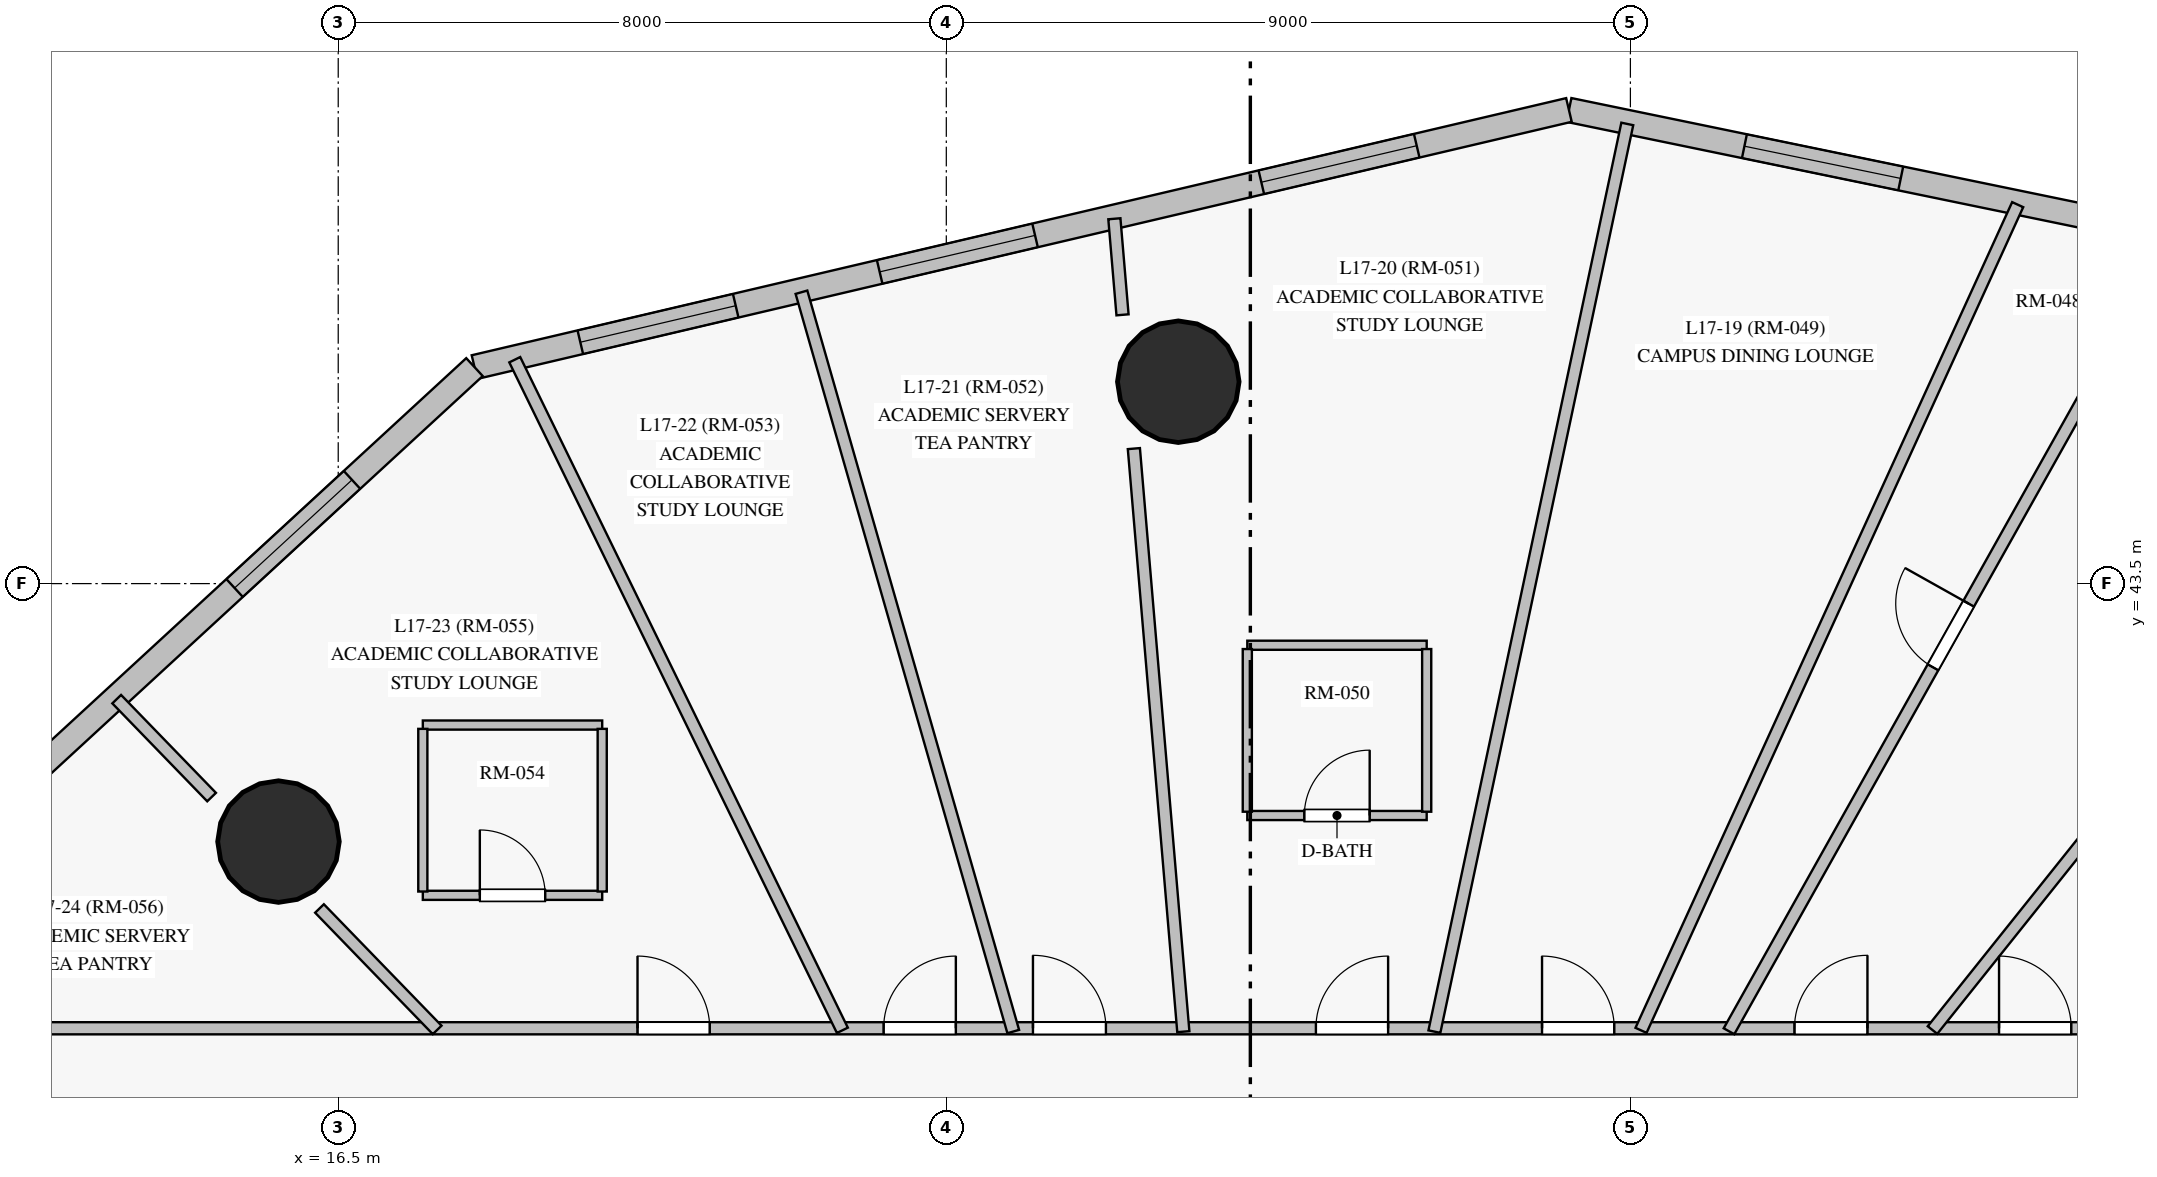
"""IFC4 building model, lengths in metres.
Left out: names, types, materials, properties, quantities, classifications, styles, units other than length and angle.
Written with IfcOpenShell. Run it as: python <this file> out.ifc"""

import sys

from ifc_helpers import new_model, si_unit, direction, frame, frame_2d, origin, origin_with_axes, origin_2d, place, context, subcontext, project, spatial, rectangle, circle, extrude, source, transform, mapped, element, fill, save


model = new_model("IFC4")
c1 = context("Model", 3, precision=1e-05, world=origin(), true_north=direction((0.0, 1.0)))
c2 = subcontext(c1, "Body", "Model", "MODEL_VIEW")
j1 = project(units=[si_unit("LENGTHUNIT", "METRE"), si_unit("PLANEANGLEUNIT", "RADIAN")], contexts=[c1])
p1 = place(None, origin())
s1 = spatial("IfcSite", under=j1, at=p1, CompositionType="ELEMENT")
p2 = place(p1, origin())
s2 = spatial("IfcBuilding", under=s1, at=p2, CompositionType="ELEMENT")
p3 = place(p2, frame((0.0, 0.0, 66.1)))
s3 = spatial("IfcBuildingStorey", under=s2, at=p3, CompositionType="ELEMENT", Elevation=66.1)
m1 = source(origin_with_axes(), c2, "Body", "SweptSolid", [
    extrude(circle(Radius=0.8, at=origin_2d()), origin(), (0.0, 0.0, 1.0), 3.6),
])
for number, where, z_axis, x_axis in (
    (1, (27.552, 46.156, 0.0), (0.0, 0.0, 1.0), (1.0, 0.0, 0.0)),
    (2, (15.714, 40.106, 0.0), (0.0, 0.0, 1.0), (1.0, 0.0, 0.0)),
):
    element("IfcColumn", number, at=place(p3, frame(where, z_axis=z_axis, x_axis=x_axis)), inside=s3, PredefinedType="COLUMN", context=c2, shape_type="MappedRepresentation", body=[
        mapped(m1, transform((0.0, 0.0, 0.0), scale=1.0)),
    ])
p4 = place(p3, frame((42.676, 47.671, 0.0), z_axis=(0.0, 0.0, 1.0), x_axis=(-0.979362200274, 0.20211303935, 0.0)))
e3 = element("IfcWall", 3, at=p4, inside=s3, PredefinedType="SOLIDWALL", context=c2, shape_type="SweptSolid", body=[
    extrude(rectangle(XDim=10.195, YDim=0.32, at=frame_2d((5.098, 0.0))), origin(), (0.0, 0.0, 1.0), 3.35),
])
p5 = place(p4, frame((5.738, 0.0, 0.85)))
e4 = element("IfcOpeningElement", 4, at=p5, cuts=e3, PredefinedType="OPENING", context=c2, shape_type="SweptSolid", body=[
    extrude(rectangle(XDim=2.1, YDim=1.95, at=frame_2d((1.05, 0.975))), frame((0.0, 0.17, 0.0), z_axis=(0.0, -1.0, 0.0), x_axis=(1.0, 0.0, 0.0)), (0.0, 0.0, 1.0), 0.34),
])
p6 = place(p3, frame((32.691, 49.731, 0.0), z_axis=(0.0, 0.0, 1.0), x_axis=(-0.973494178879, -0.228711791759, 0.0)))
e5 = element("IfcWall", 5, at=p6, inside=s3, PredefinedType="SOLIDWALL", context=c2, shape_type="SweptSolid", body=[
    extrude(rectangle(XDim=14.791, YDim=0.32, at=frame_2d((7.396, 0.0))), origin(), (0.0, 0.0, 1.0), 3.35),
])
p7 = place(p6, frame((2.057, 0.0, 0.85)))
e6 = element("IfcOpeningElement", 6, at=p7, cuts=e5, PredefinedType="OPENING", context=c2, shape_type="SweptSolid", body=[
    extrude(rectangle(XDim=2.1, YDim=1.95, at=frame_2d((1.05, 0.975))), frame((0.0, 0.17, 0.0), z_axis=(0.0, -1.0, 0.0), x_axis=(1.0, 0.0, 0.0)), (0.0, 0.0, 1.0), 0.34),
])
p8 = place(p6, frame((7.215, 0.0, 0.85)))
e7 = element("IfcOpeningElement", 7, at=p8, cuts=e5, PredefinedType="OPENING", context=c2, shape_type="SweptSolid", body=[
    extrude(rectangle(XDim=2.1, YDim=1.95, at=frame_2d((1.05, 0.975))), frame((0.0, 0.17, 0.0), z_axis=(0.0, -1.0, 0.0), x_axis=(1.0, 0.0, 0.0)), (0.0, 0.0, 1.0), 0.34),
])
p9 = place(p6, frame((11.26, 0.0, 0.85)))
e8 = element("IfcOpeningElement", 8, at=p9, cuts=e5, PredefinedType="OPENING", context=c2, shape_type="SweptSolid", body=[
    extrude(rectangle(XDim=2.1, YDim=1.95, at=frame_2d((1.05, 0.975))), frame((0.0, 0.17, 0.0), z_axis=(0.0, -1.0, 0.0), x_axis=(1.0, 0.0, 0.0)), (0.0, 0.0, 1.0), 0.34),
])
p10 = place(p3, frame((18.293, 46.348, 0.0), z_axis=(0.0, 0.0, 1.0), x_axis=(-0.735624378621, -0.677389676316, 0.0)))
e9 = element("IfcWall", 9, at=p10, inside=s3, PredefinedType="SOLIDWALL", context=c2, shape_type="SweptSolid", body=[
    extrude(rectangle(XDim=11.873, YDim=0.32, at=frame_2d((5.937, 0.0))), origin(), (0.0, 0.0, 1.0), 3.35),
])
p11 = place(p10, frame((2.19, 0.0, 0.85)))
e10 = element("IfcOpeningElement", 10, at=p11, cuts=e9, PredefinedType="OPENING", context=c2, shape_type="SweptSolid", body=[
    extrude(rectangle(XDim=2.1, YDim=1.95, at=frame_2d((1.05, 0.975))), frame((0.0, 0.17, 0.0), z_axis=(0.0, -1.0, 0.0), x_axis=(1.0, 0.0, 0.0)), (0.0, 0.0, 1.0), 0.34),
])
p12 = place(p10, frame((8.067, 0.0, 0.85)))
e11 = element("IfcOpeningElement", 11, at=p12, cuts=e9, PredefinedType="OPENING", context=c2, shape_type="SweptSolid", body=[
    extrude(rectangle(XDim=2.1, YDim=1.95, at=frame_2d((1.05, 0.975))), frame((0.0, 0.17, 0.0), z_axis=(0.0, -1.0, 0.0), x_axis=(1.0, 0.0, 0.0)), (0.0, 0.0, 1.0), 0.34),
])
p13 = place(p3, frame((10.5, 37.65, 0.0), z_axis=(0.0, 0.0, 1.0), x_axis=(1.0, 0.0, 0.0)))
e12 = element("IfcWall", 12, at=p13, inside=s3, PredefinedType="PARTITIONING", context=c2, shape_type="SweptSolid", body=[
    extrude(rectangle(XDim=29.75, YDim=0.16, at=frame_2d((14.875, 0.0))), origin(), (0.0, 0.0, 1.0), 2.75),
])
p14 = place(p13, frame((27.85, 0.0, 0.0)))
e13 = element("IfcOpeningElement", 13, at=p14, cuts=e12, PredefinedType="OPENING", context=c2, shape_type="SweptSolid", body=[
    extrude(rectangle(XDim=0.95, YDim=2.15, at=frame_2d((0.475, 1.075))), frame((0.0, 0.09, 0.0), z_axis=(0.0, -1.0, 0.0), x_axis=(1.0, 0.0, 0.0)), (0.0, 0.0, 1.0), 0.18),
])
p15 = place(p13, frame((25.159, 0.0, 0.0)))
e14 = element("IfcOpeningElement", 14, at=p15, cuts=e12, PredefinedType="OPENING", context=c2, shape_type="SweptSolid", body=[
    extrude(rectangle(XDim=0.96, YDim=2.15, at=frame_2d((0.48, 1.075))), frame((0.0, 0.09, 0.0), z_axis=(0.0, -1.0, 0.0), x_axis=(1.0, 0.0, 0.0)), (0.0, 0.0, 1.0), 0.18),
])
p16 = place(p13, frame((21.837, 0.0, 0.0)))
e15 = element("IfcOpeningElement", 15, at=p16, cuts=e12, PredefinedType="OPENING", context=c2, shape_type="SweptSolid", body=[
    extrude(rectangle(XDim=0.95, YDim=2.15, at=frame_2d((0.475, 1.075))), frame((0.0, 0.09, 0.0), z_axis=(0.0, -1.0, 0.0), x_axis=(1.0, 0.0, 0.0)), (0.0, 0.0, 1.0), 0.18),
])
p17 = place(p13, frame((18.863, 0.0, 0.0)))
e16 = element("IfcOpeningElement", 16, at=p17, cuts=e12, PredefinedType="OPENING", context=c2, shape_type="SweptSolid", body=[
    extrude(rectangle(XDim=0.95, YDim=2.15, at=frame_2d((0.475, 1.075))), frame((0.0, 0.09, 0.0), z_axis=(0.0, -1.0, 0.0), x_axis=(1.0, 0.0, 0.0)), (0.0, 0.0, 1.0), 0.18),
])
p18 = place(p13, frame((15.14, 0.0, 0.0)))
e17 = element("IfcOpeningElement", 17, at=p18, cuts=e12, PredefinedType="OPENING", context=c2, shape_type="SweptSolid", body=[
    extrude(rectangle(XDim=0.96, YDim=2.15, at=frame_2d((0.48, 1.075))), frame((0.0, 0.09, 0.0), z_axis=(0.0, -1.0, 0.0), x_axis=(1.0, 0.0, 0.0)), (0.0, 0.0, 1.0), 0.18),
])
p19 = place(p13, frame((13.176, 0.0, 0.0)))
e18 = element("IfcOpeningElement", 18, at=p19, cuts=e12, PredefinedType="OPENING", context=c2, shape_type="SweptSolid", body=[
    extrude(rectangle(XDim=0.95, YDim=2.15, at=frame_2d((0.475, 1.075))), frame((0.0, 0.09, 0.0), z_axis=(0.0, -1.0, 0.0), x_axis=(1.0, 0.0, 0.0)), (0.0, 0.0, 1.0), 0.18),
])
p20 = place(p13, frame((9.938, 0.0, 0.0)))
e19 = element("IfcOpeningElement", 19, at=p20, cuts=e12, PredefinedType="OPENING", context=c2, shape_type="SweptSolid", body=[
    extrude(rectangle(XDim=0.95, YDim=2.15, at=frame_2d((0.475, 1.075))), frame((0.0, 0.09, 0.0), z_axis=(0.0, -1.0, 0.0), x_axis=(1.0, 0.0, 0.0)), (0.0, 0.0, 1.0), 0.18),
])
p21 = place(p3, frame((30.921, 37.606, 0.0), z_axis=(0.0, 0.0, 1.0), x_axis=(0.207881716817, 0.978153971424, 0.0)))
e20 = element("IfcWall", 20, at=p21, inside=s3, PredefinedType="PARTITIONING", context=c2, shape_type="SweptSolid", body=[
    extrude(rectangle(XDim=12.208, YDim=0.16, at=frame_2d((6.104, 0.0))), origin(), (0.0, 0.0, 1.0), 3.35),
])
p22 = place(p3, frame((34.797, 37.611, 0.0), z_axis=(0.0, 0.0, 1.0), x_axis=(0.488977567901, 0.872296359094, 0.0)))
e21 = element("IfcWall", 21, at=p22, inside=s3, PredefinedType="PARTITIONING", context=c2, shape_type="SweptSolid", body=[
    extrude(rectangle(XDim=11.979, YDim=0.16, at=frame_2d((5.989, 0.0))), origin(), (0.0, 0.0, 1.0), 3.35),
])
p23 = place(p22, frame((5.489, 0.0, 0.0)))
e22 = element("IfcOpeningElement", 22, at=p23, cuts=e21, PredefinedType="OPENING", context=c2, shape_type="SweptSolid", body=[
    extrude(rectangle(XDim=0.96, YDim=2.15, at=frame_2d((0.48, 1.075))), frame((0.0, 0.09, 0.0), z_axis=(0.0, -1.0, 0.0), x_axis=(1.0, 0.0, 0.0)), (0.0, 0.0, 1.0), 0.18),
])
p24 = place(p3, frame((33.64, 37.623, 0.0), z_axis=(0.0, 0.0, 1.0), x_axis=(0.41503042051, 0.90980753462, 0.0)))
e23 = element("IfcWall", 23, at=p24, inside=s3, PredefinedType="PARTITIONING", context=c2, shape_type="SweptSolid", body=[
    extrude(rectangle(XDim=11.94, YDim=0.16, at=frame_2d((5.97, 0.0))), origin(), (0.0, 0.0, 1.0), 3.35),
])
p25 = place(p3, frame((37.475, 37.627, 0.0), z_axis=(0.0, 0.0, 1.0), x_axis=(0.62453496585, 0.780996847901, 0.0)))
e24 = element("IfcWall", 24, at=p25, inside=s3, PredefinedType="PARTITIONING", context=c2, shape_type="SweptSolid", body=[
    extrude(rectangle(XDim=10.974, YDim=0.16, at=frame_2d((5.487, 0.0))), origin(), (0.0, 0.0, 1.0), 3.35),
])
p26 = place(p3, frame((25.381, 37.607, 0.0), z_axis=(0.0, 0.0, 1.0), x_axis=(-0.275371208418, 0.961337972606, 0.0)))
e25 = element("IfcWall", 25, at=p26, inside=s3, PredefinedType="PARTITIONING", context=c2, shape_type="SweptSolid", body=[
    extrude(rectangle(XDim=10.118, YDim=0.16, at=frame_2d((5.059, 0.0))), origin(), (0.0, 0.0, 1.0), 3.35),
])
p27 = place(p3, frame((23.133, 37.623, 0.0), z_axis=(0.0, 0.0, 1.0), x_axis=(-0.438969753353, 0.898501839531, 0.0)))
e26 = element("IfcWall", 26, at=p27, inside=s3, PredefinedType="PARTITIONING", context=c2, shape_type="SweptSolid", body=[
    extrude(rectangle(XDim=9.819, YDim=0.16, at=frame_2d((4.91, 0.0))), origin(), (0.0, 0.0, 1.0), 3.35),
])
p28 = place(p3, frame((27.618, 37.605, 0.0), z_axis=(0.0, 0.0, 1.0), x_axis=(-0.084549280714, 0.996419298855, 0.0)))
e27 = element("IfcWall", 27, at=p28, inside=s3, PredefinedType="PARTITIONING", context=c2, shape_type="SweptSolid", body=[
    extrude(rectangle(XDim=7.698, YDim=0.16, at=frame_2d((3.849, 0.0))), origin(), (0.0, 0.0, 1.0), 2.7),
])
p29 = place(p3, frame((28.46, 40.449, 0.0), z_axis=(0.0, 0.0, 1.0), x_axis=(1.0, 0.0, 0.0)))
e28 = element("IfcWall", 28, at=p29, inside=s3, PredefinedType="PARTITIONING", context=c2, shape_type="SweptSolid", body=[
    extrude(rectangle(XDim=2.36, YDim=0.12, at=frame_2d((1.18, 0.0))), origin(), (0.0, 0.0, 1.0), 2.75),
])
p30 = place(p29, frame((0.75, 0.0, 0.0)))
e29 = element("IfcOpeningElement", 29, at=p30, cuts=e28, PredefinedType="OPENING", context=c2, shape_type="SweptSolid", body=[
    extrude(rectangle(XDim=0.86, YDim=2.1, at=frame_2d((0.43, 1.05))), frame((0.0, 0.07, 0.0), z_axis=(0.0, -1.0, 0.0), x_axis=(1.0, 0.0, 0.0)), (0.0, 0.0, 1.0), 0.14),
])
p31 = place(p3, frame((30.82, 42.689, 0.0), z_axis=(0.0, 0.0, 1.0), x_axis=(-1.0, 0.0, 0.0)))
e30 = element("IfcWall", 30, at=p31, inside=s3, PredefinedType="PARTITIONING", context=c2, shape_type="SweptSolid", body=[
    extrude(rectangle(XDim=2.36, YDim=0.12, at=frame_2d((1.18, 0.0))), origin(), (0.0, 0.0, 1.0), 2.75),
])
p32 = place(p3, frame((17.613, 39.399, 0.0), z_axis=(0.0, 0.0, 1.0), x_axis=(1.0, 0.0, 0.0)))
e31 = element("IfcWall", 31, at=p32, inside=s3, PredefinedType="PARTITIONING", context=c2, shape_type="SweptSolid", body=[
    extrude(rectangle(XDim=2.36, YDim=0.12, at=frame_2d((1.18, 0.0))), origin(), (0.0, 0.0, 1.0), 2.75),
])
p33 = place(p32, frame((0.75, 0.0, 0.0)))
e32 = element("IfcOpeningElement", 32, at=p33, cuts=e31, PredefinedType="OPENING", context=c2, shape_type="SweptSolid", body=[
    extrude(rectangle(XDim=0.86, YDim=2.1, at=frame_2d((0.43, 1.05))), frame((0.0, 0.07, 0.0), z_axis=(0.0, -1.0, 0.0), x_axis=(1.0, 0.0, 0.0)), (0.0, 0.0, 1.0), 0.14),
])
p34 = place(p3, frame((19.973, 41.639, 0.0), z_axis=(0.0, 0.0, 1.0), x_axis=(-1.0, 0.0, 0.0)))
e33 = element("IfcWall", 33, at=p34, inside=s3, PredefinedType="PARTITIONING", context=c2, shape_type="SweptSolid", body=[
    extrude(rectangle(XDim=2.36, YDim=0.12, at=frame_2d((1.18, 0.0))), origin(), (0.0, 0.0, 1.0), 2.75),
])
p35 = place(p3, frame((17.802, 37.628, 0.0), z_axis=(0.0, 0.0, 1.0), x_axis=(-0.695823523946, 0.718212798218, 0.0)))
e34 = element("IfcWall", 34, at=p35, inside=s3, PredefinedType="PARTITIONING", context=c2, shape_type="SweptSolid", body=[
    extrude(rectangle(XDim=2.225, YDim=0.16, at=frame_2d((1.112, 0.0))), origin(), (0.0, 0.0, 1.0), 2.7),
])
for number, where, z_axis, x_axis in (
    (35, (30.82, 40.499, 0.0), (0.0, 0.0, 1.0), (0.0, 1.0, 0.0)),
    (36, (28.46, 42.639, 0.0), (0.0, 0.0, 1.0), (0.0, -1.0, 0.0)),
):
    element("IfcWall", number, at=place(p3, frame(where, z_axis=z_axis, x_axis=x_axis)), inside=s3, PredefinedType="PARTITIONING", context=c2, shape_type="SweptSolid", body=[
        extrude(rectangle(XDim=2.14, YDim=0.12, at=frame_2d((1.07, 0.0))), origin(), (0.0, 0.0, 1.0), 3.35),
    ])
for number, where, z_axis, x_axis in (
    (37, (19.973, 39.449, 0.0), (0.0, 0.0, 1.0), (0.0, 1.0, 0.0)),
    (38, (17.613, 41.589, 0.0), (0.0, 0.0, 1.0), (0.0, -1.0, 0.0)),
):
    element("IfcWall", number, at=place(p3, frame(where, z_axis=z_axis, x_axis=x_axis)), inside=s3, PredefinedType="PARTITIONING", context=c2, shape_type="SweptSolid", body=[
        extrude(rectangle(XDim=2.14, YDim=0.12, at=frame_2d((1.07, 0.0))), origin(), (0.0, 0.0, 1.0), 3.35),
    ])
p36 = place(p3, frame((14.834, 40.691, 0.0), z_axis=(0.0, 0.0, 1.0), x_axis=(-0.695858838833, 0.718178582539, 0.0)))
e39 = element("IfcWall", 39, at=p36, inside=s3, PredefinedType="PARTITIONING", context=c2, shape_type="SweptSolid", body=[
    extrude(rectangle(XDim=1.794, YDim=0.16, at=frame_2d((0.897, 0.0))), origin(), (0.0, 0.0, 1.0), 3.35),
])
p37 = place(p3, frame((26.818, 47.036, 0.0), z_axis=(0.0, 0.0, 1.0), x_axis=(-0.084494899991, 0.996423911734, 0.0)))
e40 = element("IfcWall", 40, at=p37, inside=s3, PredefinedType="PARTITIONING", context=c2, shape_type="SweptSolid", body=[
    extrude(rectangle(XDim=1.269, YDim=0.16, at=frame_2d((0.634, 0.0))), origin(), (0.0, 0.0, 1.0), 3.35),
])
m2 = source(origin_with_axes(), c2, "Body", "SweptSolid", [
    extrude(rectangle(XDim=2.1, YDim=1.95, at=frame_2d((1.05, 0.975))), frame((0.0, 0.03, 0.0), z_axis=(0.0, -1.0, 0.0), x_axis=(1.0, 0.0, 0.0)), (0.0, 0.0, 1.0), 0.06),
])
p38 = place(p5, origin())
e41 = element("IfcWindow", 41, at=p38, inside=s3, PartitioningType="SINGLE_PANEL", PredefinedType="WINDOW", context=c2, shape_type="MappedRepresentation", body=[
    mapped(m2, transform((0.0, 0.0, 0.0), scale=1.0)),
])
fill(e4, e41)
p39 = place(p7, origin())
e42 = element("IfcWindow", 42, at=p39, inside=s3, PartitioningType="SINGLE_PANEL", PredefinedType="WINDOW", context=c2, shape_type="MappedRepresentation", body=[
    mapped(m2, transform((0.0, 0.0, 0.0), scale=1.0)),
])
fill(e6, e42)
p40 = place(p8, origin())
e43 = element("IfcWindow", 43, at=p40, inside=s3, PartitioningType="SINGLE_PANEL", PredefinedType="WINDOW", context=c2, shape_type="MappedRepresentation", body=[
    mapped(m2, transform((0.0, 0.0, 0.0), scale=1.0)),
])
fill(e7, e43)
p41 = place(p9, origin())
e44 = element("IfcWindow", 44, at=p41, inside=s3, PartitioningType="SINGLE_PANEL", PredefinedType="WINDOW", context=c2, shape_type="MappedRepresentation", body=[
    mapped(m2, transform((0.0, 0.0, 0.0), scale=1.0)),
])
fill(e8, e44)
p42 = place(p11, origin())
e45 = element("IfcWindow", 45, at=p42, inside=s3, PartitioningType="SINGLE_PANEL", PredefinedType="WINDOW", context=c2, shape_type="MappedRepresentation", body=[
    mapped(m2, transform((0.0, 0.0, 0.0), scale=1.0)),
])
fill(e10, e45)
m3 = source(origin_with_axes(), c2, "Body", "SweptSolid", [
    extrude(rectangle(XDim=0.86, YDim=2.1, at=frame_2d((0.43, 1.05))), frame((0.0, 0.025, 0.0), z_axis=(0.0, -1.0, 0.0), x_axis=(1.0, 0.0, 0.0)), (0.0, 0.0, 1.0), 0.05),
])
p43 = place(p30, origin())
e46 = element("IfcDoor", 46, at=p43, inside=s3, OperationType="SINGLE_SWING_RIGHT", PredefinedType="DOOR", context=c2, shape_type="MappedRepresentation", body=[
    mapped(m3, transform((0.0, 0.0, 0.0), scale=1.0)),
])
fill(e29, e46)
p44 = place(p33, origin())
e47 = element("IfcDoor", 47, at=p44, inside=s3, OperationType="SINGLE_SWING_LEFT", PredefinedType="DOOR", context=c2, shape_type="MappedRepresentation", body=[
    mapped(m3, transform((0.0, 0.0, 0.0), scale=1.0)),
])
fill(e32, e47)
m4 = source(origin_with_axes(), c2, "Body", "SweptSolid", [
    extrude(rectangle(XDim=0.95, YDim=2.15, at=frame_2d((0.475, 1.075))), frame((0.0, 0.025, 0.0), z_axis=(0.0, -1.0, 0.0), x_axis=(1.0, 0.0, 0.0)), (0.0, 0.0, 1.0), 0.05),
])
p45 = place(p14, origin())
e48 = element("IfcDoor", 48, at=p45, inside=s3, OperationType="SINGLE_SWING_LEFT", PredefinedType="DOOR", context=c2, shape_type="MappedRepresentation", body=[
    mapped(m4, transform((0.0, 0.0, 0.0), scale=1.0)),
])
fill(e13, e48)
m5 = source(origin_with_axes(), c2, "Body", "SweptSolid", [
    extrude(rectangle(XDim=0.96, YDim=2.15, at=frame_2d((0.48, 1.075))), frame((0.0, 0.025, 0.0), z_axis=(0.0, -1.0, 0.0), x_axis=(1.0, 0.0, 0.0)), (0.0, 0.0, 1.0), 0.05),
])
p46 = place(p15, origin())
e49 = element("IfcDoor", 49, at=p46, inside=s3, OperationType="SINGLE_SWING_RIGHT", PredefinedType="DOOR", context=c2, shape_type="MappedRepresentation", body=[
    mapped(m5, transform((0.0, 0.0, 0.0), scale=1.0)),
])
fill(e14, e49)
p47 = place(p16, origin())
e50 = element("IfcDoor", 50, at=p47, inside=s3, OperationType="SINGLE_SWING_LEFT", PredefinedType="DOOR", context=c2, shape_type="MappedRepresentation", body=[
    mapped(m4, transform((0.0, 0.0, 0.0), scale=1.0)),
])
fill(e15, e50)
p48 = place(p17, origin())
e51 = element("IfcDoor", 51, at=p48, inside=s3, OperationType="SINGLE_SWING_RIGHT", PredefinedType="DOOR", context=c2, shape_type="MappedRepresentation", body=[
    mapped(m4, transform((0.0, 0.0, 0.0), scale=1.0)),
])
fill(e16, e51)
p49 = place(p18, origin())
e52 = element("IfcDoor", 52, at=p49, inside=s3, OperationType="SINGLE_SWING_LEFT", PredefinedType="DOOR", context=c2, shape_type="MappedRepresentation", body=[
    mapped(m5, transform((0.0, 0.0, 0.0), scale=1.0)),
])
fill(e17, e52)
p50 = place(p19, origin())
e53 = element("IfcDoor", 53, at=p50, inside=s3, OperationType="SINGLE_SWING_RIGHT", PredefinedType="DOOR", context=c2, shape_type="MappedRepresentation", body=[
    mapped(m4, transform((0.0, 0.0, 0.0), scale=1.0)),
])
fill(e18, e53)
p51 = place(p20, origin())
e54 = element("IfcDoor", 54, at=p51, inside=s3, OperationType="SINGLE_SWING_LEFT", PredefinedType="DOOR", context=c2, shape_type="MappedRepresentation", body=[
    mapped(m4, transform((0.0, 0.0, 0.0), scale=1.0)),
])
fill(e19, e54)
p52 = place(p23, origin())
e55 = element("IfcDoor", 55, at=p52, inside=s3, OperationType="SINGLE_SWING_RIGHT", PredefinedType="DOOR", context=c2, shape_type="MappedRepresentation", body=[
    mapped(m5, transform((0.0, 0.0, 0.0), scale=1.0)),
])
fill(e22, e55)
save(model, sys.argv[1])
